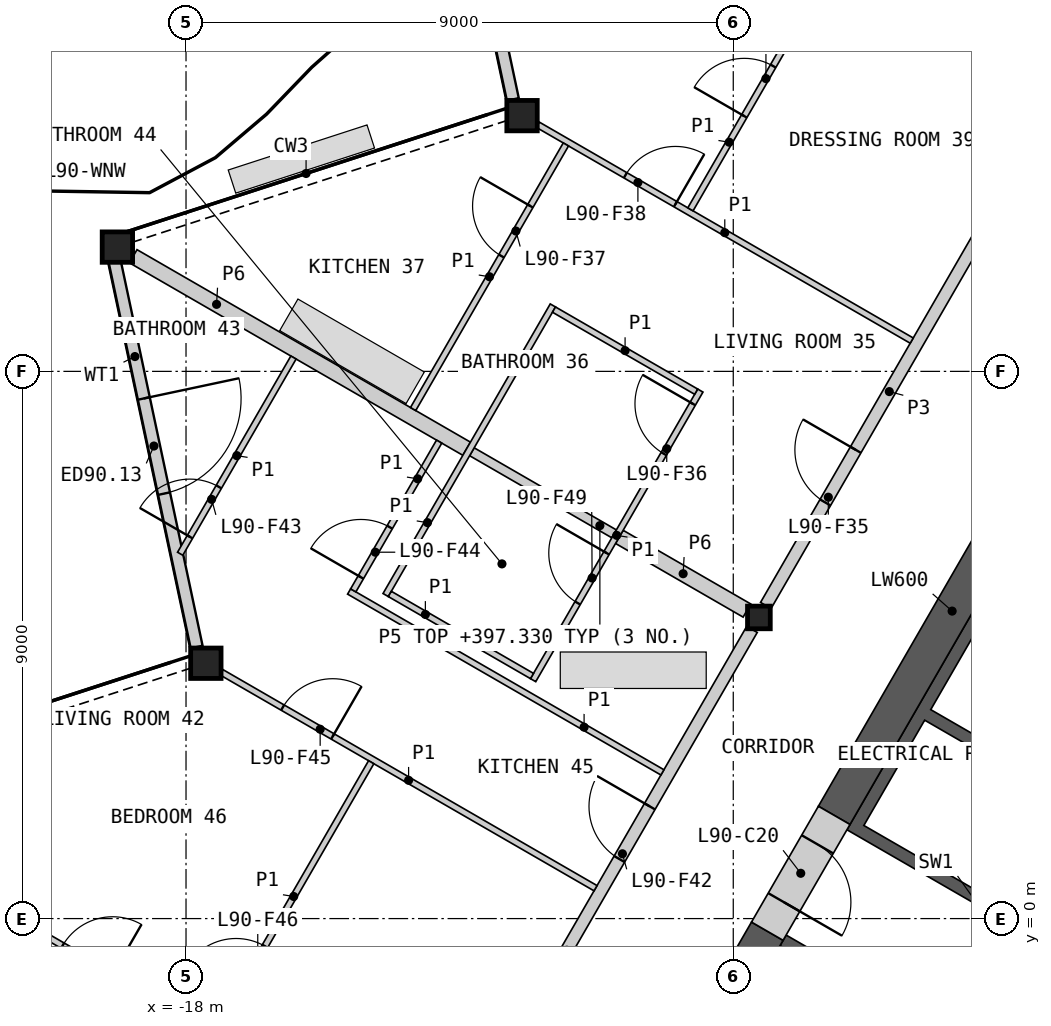
"""IFC4 building model, lengths in metres.
Left out: names, types, materials, properties, quantities, classifications, styles, units other than length and angle.
Written with IfcOpenShell. Run it as: python <this file> out.ifc"""

import sys

from ifc_helpers import new_model, si_unit, direction, frame, frame_2d, origin, origin_2d, place, context, subcontext, project, spatial, polyline, rectangle, hollow_rectangle, i_section, outline, extrude, element, fill, save


model = new_model("IFC4")
c1 = context("Model", 3, precision=1e-05, world=origin(), true_north=direction((0.0, 1.0)))
c2 = subcontext(c1, "Body", "Model", "MODEL_VIEW")
j1 = project(units=[si_unit("LENGTHUNIT", "METRE"), si_unit("PLANEANGLEUNIT", "RADIAN")], contexts=[c1])
p1 = place(None, origin())
s1 = spatial("IfcSite", under=j1, at=p1, CompositionType="ELEMENT")
p2 = place(p1, origin())
s2 = spatial("IfcBuilding", under=s1, at=p2, CompositionType="ELEMENT")
p3 = place(p2, frame((0.0, 0.0, 395.0)))
s3 = spatial("IfcBuildingStorey", under=s2, at=p3, CompositionType="ELEMENT", Elevation=395.0)
for number, where, z_axis, x_axis in (
    (1, (-12.474, 13.206, 0.0), (0.0, 0.0, 1.0), (1.0, 0.0, 0.0)),
    (2, (-19.129, 11.044, 0.0), (0.0, 0.0, 1.0), (1.0, 0.0, 0.0)),
    (3, (-17.674, 4.199, 0.0), (0.0, 0.0, 1.0), (1.0, 0.0, 0.0)),
):
    element("IfcColumn", number, at=place(p3, frame(where, z_axis=z_axis, x_axis=x_axis)), inside=s3, PredefinedType="COLUMN", context=c2, shape_type="SweptSolid", body=[
        extrude(hollow_rectangle(XDim=0.5, YDim=0.5, WallThickness=0.03, at=origin_2d()), origin(), (0.0, 0.0, 1.0), 3.4),
    ])
p4 = place(p3, frame((-8.578, 4.953, 0.0), z_axis=(0.0, 0.0, 1.0), x_axis=(1.0, 0.0, 0.0)))
e4 = element("IfcColumn", 4, at=p4, inside=s3, PredefinedType="COLUMN", context=c2, shape_type="SweptSolid", body=[
    extrude(i_section(OverallWidth=0.374, OverallDepth=0.372, WebThickness=0.016, FlangeThickness=0.026, at=origin_2d()), origin(), (0.0, 0.0, 1.0), 3.4),
])
p5 = place(p3, frame((-13.979, 19.843, 0.0), z_axis=(0.0, 0.0, 1.0), x_axis=(0.207910765171, -0.978147797486, 0.0)))
e5 = element("IfcWall", 5, at=p5, inside=s3, PredefinedType="SOLIDWALL", context=c2, shape_type="SweptSolid", body=[
    extrude(rectangle(XDim=6.512, YDim=0.2, at=frame_2d((3.256, 0.0))), origin(), (0.0, 0.0, 1.0), 2.634),
])
p6 = place(p5, frame((2.333, 0.0, 0.0)))
e6 = element("IfcOpeningElement", 6, at=p6, cuts=e5, PredefinedType="OPENING", context=c2, shape_type="SweptSolid", body=[
    extrude(rectangle(XDim=1.6, YDim=2.25, at=frame_2d((0.8, 1.125))), frame((0.0, 0.11, 0.0), z_axis=(0.0, -1.0, 0.0), x_axis=(1.0, 0.0, 0.0)), (0.0, 0.0, 1.0), 0.22),
])
p7 = place(p3, frame((-19.179, 10.836, 0.0), z_axis=(0.0, 0.0, 1.0), x_axis=(0.207910765171, -0.978147797486, 0.0)))
e7 = element("IfcWall", 7, at=p7, inside=s3, PredefinedType="SOLIDWALL", context=c2, shape_type="SweptSolid", body=[
    extrude(rectangle(XDim=6.512, YDim=0.2, at=frame_2d((3.256, 0.0))), origin(), (0.0, 0.0, 1.0), 2.634),
])
p8 = place(p7, frame((2.333, 0.0, 0.0)))
e8 = element("IfcOpeningElement", 8, at=p8, cuts=e7, PredefinedType="OPENING", context=c2, shape_type="SweptSolid", body=[
    extrude(rectangle(XDim=1.6, YDim=2.25, at=frame_2d((0.8, 1.125))), frame((0.0, 0.11, 0.0), z_axis=(0.0, -1.0, 0.0), x_axis=(1.0, 0.0, 0.0)), (0.0, 0.0, 1.0), 0.22),
])
p9 = place(p3, origin())
e9 = element("IfcWall", 9, at=p9, inside=s3, PredefinedType="SHEAR", context=c2, shape_type="SweptSolid", body=[
    extrude(outline(polyline([(-6.061, -1.697), (-8.231, -0.444), (-8.131, -0.271), (-5.96, -1.524), (-6.061, -1.697)])), origin(), (0.0, 0.0, 1.0), 3.1),
])
p10 = place(p3, origin())
e10 = element("IfcWall", 10, at=p10, inside=s3, PredefinedType="SHEAR", context=c2, shape_type="SweptSolid", body=[
    extrude(outline(polyline([(-4.96, 0.208), (-7.131, 1.461), (-3.731, 7.35), (-1.561, 6.097), (-1.66, 5.924), (-3.652, 7.074), (-5.752, 3.437), (-3.76, 2.287), (-3.861, 2.113), (-5.852, 3.263), (-6.852, 1.531), (-4.861, 0.381), (-4.96, 0.208)])), origin(), (0.0, 0.0, 1.0), 3.1),
])
p11 = place(p3, frame((-3.461, 8.417, 0.0), z_axis=(0.0, 0.0, 1.0), x_axis=(-0.50000391502, -0.866023143435, 0.0)))
e11 = element("IfcWall", 11, at=p11, inside=s3, PredefinedType="SHEAR", context=c2, shape_type="SweptSolid", body=[
    extrude(rectangle(XDim=7.759, YDim=0.6, at=frame_2d((3.879, 0.0))), origin(), (0.0, 0.0, 1.0), 3.1),
])
p12 = place(p3, frame((-8.44, -0.208, 0.0), z_axis=(0.0, 0.0, 1.0), x_axis=(-0.500007425856, -0.866021116422, 0.0)))
e12 = element("IfcWall", 12, at=p12, inside=s3, PredefinedType="SHEAR", context=c2, shape_type="SweptSolid", body=[
    extrude(rectangle(XDim=4.969, YDim=0.6, at=frame_2d((2.484, 0.0))), origin(), (0.0, 0.0, 1.0), 3.1),
])
p13 = place(p3, frame((-7.34, 1.698, 0.0), z_axis=(0.0, 0.0, 1.0), x_axis=(-0.50002983664, -0.866008176907, 0.0)))
e13 = element("IfcWall", 13, at=p13, inside=s3, PredefinedType="SHEAR", context=c2, shape_type="SweptSolid", body=[
    extrude(rectangle(XDim=2.2, YDim=0.6, at=frame_2d((1.1, 0.0))), origin(), (0.0, 0.0, 1.0), 3.1),
])
p14 = place(p13, frame((0.55, 0.0, 0.0)))
e14 = element("IfcOpeningElement", 14, at=p14, cuts=e13, PredefinedType="OPENING", context=c2, shape_type="SweptSolid", body=[
    extrude(rectangle(XDim=1.1, YDim=2.1, at=frame_2d((0.55, 1.05))), frame((0.0, 0.31, 0.0), z_axis=(0.0, -1.0, 0.0), x_axis=(1.0, 0.0, 0.0)), (0.0, 0.0, 1.0), 0.62),
])
p15 = place(p3, frame((-8.465, 5.15, 0.0), z_axis=(0.0, 0.0, 1.0), x_axis=(0.499992155518, 0.866029932751, 0.0)))
e15 = element("IfcWall", 15, at=p15, inside=s3, PredefinedType="PARTITIONING", context=c2, shape_type="SweptSolid", body=[
    extrude(rectangle(XDim=8.123, YDim=0.2, at=frame_2d((4.062, 0.0))), origin(), (0.0, 0.0, 1.0), 3.1),
])
p16 = place(p15, frame((1.956, 0.0, 0.0)))
e16 = element("IfcOpeningElement", 16, at=p16, cuts=e15, PredefinedType="OPENING", context=c2, shape_type="SweptSolid", body=[
    extrude(rectangle(XDim=1.0, YDim=2.1, at=frame_2d((0.5, 1.05))), frame((0.0, 0.11, 0.0), z_axis=(0.0, -1.0, 0.0), x_axis=(1.0, 0.0, 0.0)), (0.0, 0.0, 1.0), 0.22),
])
p17 = place(p3, frame((-12.754, -2.279, 0.0), z_axis=(0.0, 0.0, 1.0), x_axis=(0.500001682468, 0.866024432409, 0.0)))
e17 = element("IfcWall", 17, at=p17, inside=s3, PredefinedType="PARTITIONING", context=c2, shape_type="SweptSolid", body=[
    extrude(rectangle(XDim=8.124, YDim=0.2, at=frame_2d((4.062, 0.0))), origin(), (0.0, 0.0, 1.0), 3.1),
])
p18 = place(p17, frame((3.762, 0.0, 0.0)))
e18 = element("IfcOpeningElement", 18, at=p18, cuts=e17, PredefinedType="OPENING", context=c2, shape_type="SweptSolid", body=[
    extrude(rectangle(XDim=1.0, YDim=2.1, at=frame_2d((0.5, 1.05))), frame((0.0, 0.11, 0.0), z_axis=(0.0, -1.0, 0.0), x_axis=(1.0, 0.0, 0.0)), (0.0, 0.0, 1.0), 0.22),
])
p19 = place(p3, frame((-18.869, 10.894, 0.0), z_axis=(0.0, 0.0, 1.0), x_axis=(0.866023139795, -0.500003921324, 0.0)))
e19 = element("IfcWall", 19, at=p19, inside=s3, PredefinedType="PARTITIONING", context=c2, shape_type="SweptSolid", body=[
    extrude(rectangle(XDim=6.332, YDim=0.25, at=frame_2d((3.166, 0.0))), origin(), (0.0, 0.0, 1.0), 2.33),
])
p20 = place(p3, frame((-10.873, 6.278, 0.0), z_axis=(0.0, 0.0, 1.0), x_axis=(0.865989219354, -0.500062668036, 0.0)))
e20 = element("IfcWall", 20, at=p20, inside=s3, PredefinedType="PARTITIONING", context=c2, shape_type="SweptSolid", body=[
    extrude(rectangle(XDim=2.423, YDim=0.25, at=frame_2d((1.211, 0.0))), origin(), (0.0, 0.0, 1.0), 2.33),
])
p21 = place(p3, frame((-13.298, 7.678, 0.0), z_axis=(0.0, 0.0, 1.0), x_axis=(0.866059108428, -0.4999416173, 0.0)))
e21 = element("IfcWall", 21, at=p21, inside=s3, PredefinedType="PLUMBINGWALL", context=c2, shape_type="SweptSolid", body=[
    extrude(rectangle(XDim=2.7, YDim=0.15, at=frame_2d((1.35, 0.0))), origin(), (0.0, 0.0, 1.0), 2.33),
])
p22 = place(p3, frame((-13.669, 19.9, 0.0), z_axis=(0.0, 0.0, 1.0), x_axis=(0.866032376801, -0.499987922186, 0.0)))
e22 = element("IfcWall", 22, at=p22, inside=s3, PredefinedType="PARTITIONING", context=c2, shape_type="SweptSolid", body=[
    extrude(rectangle(XDim=11.782, YDim=0.1, at=frame_2d((5.891, 0.0))), origin(), (0.0, 0.0, 1.0), 2.33),
])
p23 = place(p22, frame((4.664, 0.0, 0.0)))
e23 = element("IfcOpeningElement", 23, at=p23, cuts=e22, PredefinedType="OPENING", context=c2, shape_type="SweptSolid", body=[
    extrude(rectangle(XDim=0.95, YDim=2.1, at=frame_2d((0.475, 1.05))), frame((0.0, 0.06, 0.0), z_axis=(0.0, -1.0, 0.0), x_axis=(1.0, 0.0, 0.0)), (0.0, 0.0, 1.0), 0.12),
])
p24 = place(p3, frame((-24.069, 1.887, 0.0), z_axis=(0.0, 0.0, 1.0), x_axis=(0.866023404247, -0.500003463284, 0.0)))
e24 = element("IfcWall", 24, at=p24, inside=s3, PredefinedType="PARTITIONING", context=c2, shape_type="SweptSolid", body=[
    extrude(rectangle(XDim=11.782, YDim=0.1, at=frame_2d((5.891, 0.0))), origin(), (0.0, 0.0, 1.0), 2.33),
])
p25 = place(p24, frame((4.664, 0.0, 0.0)))
e25 = element("IfcOpeningElement", 25, at=p25, cuts=e24, PredefinedType="OPENING", context=c2, shape_type="SweptSolid", body=[
    extrude(rectangle(XDim=0.95, YDim=2.1, at=frame_2d((0.475, 1.05))), frame((0.0, 0.06, 0.0), z_axis=(0.0, -1.0, 0.0), x_axis=(1.0, 0.0, 0.0)), (0.0, 0.0, 1.0), 0.12),
])
p26 = place(p3, frame((-12.214, 13.056, 0.0), z_axis=(0.0, 0.0, 1.0), x_axis=(0.866018949465, -0.500011179042, 0.0)))
e26 = element("IfcWall", 26, at=p26, inside=s3, PredefinedType="PARTITIONING", context=c2, shape_type="SweptSolid", body=[
    extrude(rectangle(XDim=7.1, YDim=0.1, at=frame_2d((3.55, 0.0))), origin(), (0.0, 0.0, 1.0), 2.33),
])
p27 = place(p26, frame((1.663, 0.0, 0.0)))
e27 = element("IfcOpeningElement", 27, at=p27, cuts=e26, PredefinedType="OPENING", context=c2, shape_type="SweptSolid", body=[
    extrude(rectangle(XDim=0.95, YDim=2.1, at=frame_2d((0.475, 1.05))), frame((0.0, 0.06, 0.0), z_axis=(0.0, -1.0, 0.0), x_axis=(1.0, 0.0, 0.0)), (0.0, 0.0, 1.0), 0.12),
])
p28 = place(p3, frame((-17.414, 4.049, 0.0), z_axis=(0.0, 0.0, 1.0), x_axis=(0.866033839264, -0.499985389037, 0.0)))
e28 = element("IfcWall", 28, at=p28, inside=s3, PredefinedType="PARTITIONING", context=c2, shape_type="SweptSolid", body=[
    extrude(rectangle(XDim=7.1, YDim=0.1, at=frame_2d((3.55, 0.0))), origin(), (0.0, 0.0, 1.0), 2.33),
])
p29 = place(p28, frame((1.158, 0.0, 0.0)))
e29 = element("IfcOpeningElement", 29, at=p29, cuts=e28, PredefinedType="OPENING", context=c2, shape_type="SweptSolid", body=[
    extrude(rectangle(XDim=0.95, YDim=2.1, at=frame_2d((0.475, 1.05))), frame((0.0, 0.06, 0.0), z_axis=(0.0, -1.0, 0.0), x_axis=(1.0, 0.0, 0.0)), (0.0, 0.0, 1.0), 0.12),
])
p30 = place(p3, frame((-15.318, 5.38, 0.0), z_axis=(0.0, 0.0, 1.0), x_axis=(0.866035260786, -0.499982926783, 0.0)))
e30 = element("IfcWall", 30, at=p30, inside=s3, PredefinedType="PARTITIONING", context=c2, shape_type="SweptSolid", body=[
    extrude(rectangle(XDim=5.95, YDim=0.1, at=frame_2d((2.975, 0.0))), origin(), (0.0, 0.0, 1.0), 2.33),
])
p31 = place(p3, frame((-14.717, 5.321, 0.0), z_axis=(0.0, 0.0, 1.0), x_axis=(0.500015767406, 0.866016300277, 0.0)))
e31 = element("IfcWall", 31, at=p31, inside=s3, PredefinedType="PARTITIONING", context=c2, shape_type="SweptSolid", body=[
    extrude(rectangle(XDim=5.5, YDim=0.1, at=frame_2d((2.75, 0.0))), origin(), (0.0, 0.0, 1.0), 2.33),
])
p32 = place(p3, frame((-12.292, 3.921, 0.0), z_axis=(0.0, 0.0, 1.0), x_axis=(0.499996545922, 0.866027397988, 0.0)))
e32 = element("IfcWall", 32, at=p32, inside=s3, PredefinedType="PARTITIONING", context=c2, shape_type="SweptSolid", body=[
    extrude(rectangle(XDim=5.5, YDim=0.1, at=frame_2d((2.75, 0.0))), origin(), (0.0, 0.0, 1.0), 2.33),
])
p33 = place(p32, frame((4.3, 0.0, 0.0)))
e33 = element("IfcOpeningElement", 33, at=p33, cuts=e32, PredefinedType="OPENING", context=c2, shape_type="SweptSolid", body=[
    extrude(rectangle(XDim=0.95, YDim=2.1, at=frame_2d((0.475, 1.05))), frame((0.0, 0.06, 0.0), z_axis=(0.0, -1.0, 0.0), x_axis=(1.0, 0.0, 0.0)), (0.0, 0.0, 1.0), 0.12),
])
p34 = place(p32, frame((1.465, 0.0, 0.0)))
e34 = element("IfcOpeningElement", 34, at=p34, cuts=e32, PredefinedType="OPENING", context=c2, shape_type="SweptSolid", body=[
    extrude(rectangle(XDim=0.95, YDim=2.1, at=frame_2d((0.475, 1.05))), frame((0.0, 0.06, 0.0), z_axis=(0.0, -1.0, 0.0), x_axis=(1.0, 0.0, 0.0)), (0.0, 0.0, 1.0), 0.12),
])
p35 = place(p3, frame((-9.704, 11.665, 0.0), z_axis=(0.0, 0.0, 1.0), x_axis=(0.499984882974, 0.866034131428, 0.0)))
e35 = element("IfcWall", 35, at=p35, inside=s3, PredefinedType="PARTITIONING", context=c2, shape_type="SweptSolid", body=[
    extrude(rectangle(XDim=5.1, YDim=0.1, at=frame_2d((2.55, 0.0))), origin(), (0.0, 0.0, 1.0), 2.33),
])
p36 = place(p35, frame((1.771, 0.0, 0.0)))
e36 = element("IfcOpeningElement", 36, at=p36, cuts=e35, PredefinedType="OPENING", context=c2, shape_type="SweptSolid", body=[
    extrude(rectangle(XDim=0.95, YDim=2.1, at=frame_2d((0.475, 1.05))), frame((0.0, 0.06, 0.0), z_axis=(0.0, -1.0, 0.0), x_axis=(1.0, 0.0, 0.0)), (0.0, 0.0, 1.0), 0.12),
])
p37 = place(p3, frame((-17.504, -1.845, 0.0), z_axis=(0.0, 0.0, 1.0), x_axis=(0.499984882974, 0.866034131428, 0.0)))
e37 = element("IfcWall", 37, at=p37, inside=s3, PredefinedType="PARTITIONING", context=c2, shape_type="SweptSolid", body=[
    extrude(rectangle(XDim=5.1, YDim=0.1, at=frame_2d((2.55, 0.0))), origin(), (0.0, 0.0, 1.0), 2.33),
])
p38 = place(p37, frame((0.656, 0.0, 0.0)))
e38 = element("IfcOpeningElement", 38, at=p38, cuts=e37, PredefinedType="OPENING", context=c2, shape_type="SweptSolid", body=[
    extrude(rectangle(XDim=0.95, YDim=2.1, at=frame_2d((0.475, 1.05))), frame((0.0, 0.06, 0.0), z_axis=(0.0, -1.0, 0.0), x_axis=(1.0, 0.0, 0.0)), (0.0, 0.0, 1.0), 0.12),
])
p39 = place(p3, frame((-14.265, 8.38, 0.0), z_axis=(0.0, 0.0, 1.0), x_axis=(0.500026652407, 0.866010015463, 0.0)))
e39 = element("IfcWall", 39, at=p39, inside=s3, PredefinedType="PARTITIONING", context=c2, shape_type="SweptSolid", body=[
    extrude(rectangle(XDim=5.025, YDim=0.1, at=frame_2d((2.513, 0.0))), origin(), (0.0, 0.0, 1.0), 2.33),
])
p40 = place(p39, frame((2.906, 0.0, 0.0)))
e40 = element("IfcOpeningElement", 40, at=p40, cuts=e39, PredefinedType="OPENING", context=c2, shape_type="SweptSolid", body=[
    extrude(rectangle(XDim=0.95, YDim=2.1, at=frame_2d((0.475, 1.05))), frame((0.0, 0.06, 0.0), z_axis=(0.0, -1.0, 0.0), x_axis=(1.0, 0.0, 0.0)), (0.0, 0.0, 1.0), 0.12),
])
p41 = place(p3, frame((-18.096, 6.0, 0.0), z_axis=(0.0, 0.0, 1.0), x_axis=(0.500000333706, 0.866025211119, 0.0)))
e41 = element("IfcWall", 41, at=p41, inside=s3, PredefinedType="PARTITIONING", context=c2, shape_type="SweptSolid", body=[
    extrude(rectangle(XDim=3.727, YDim=0.1, at=frame_2d((1.863, 0.0))), origin(), (0.0, 0.0, 1.0), 2.33),
])
p42 = place(p41, frame((0.321, 0.0, 0.0)))
e42 = element("IfcOpeningElement", 42, at=p42, cuts=e41, PredefinedType="OPENING", context=c2, shape_type="SweptSolid", body=[
    extrude(rectangle(XDim=0.95, YDim=2.1, at=frame_2d((0.475, 1.05))), frame((0.0, 0.06, 0.0), z_axis=(0.0, -1.0, 0.0), x_axis=(1.0, 0.0, 0.0)), (0.0, 0.0, 1.0), 0.12),
])
p43 = place(p3, frame((-15.25, 5.398, 0.0), z_axis=(0.0, 0.0, 1.0), x_axis=(0.499959355765, 0.866048868473, 0.0)))
e43 = element("IfcWall", 43, at=p43, inside=s3, PredefinedType="PARTITIONING", context=c2, shape_type="SweptSolid", body=[
    extrude(rectangle(XDim=2.825, YDim=0.1, at=frame_2d((1.413, 0.0))), origin(), (0.0, 0.0, 1.0), 2.33),
])
p44 = place(p43, frame((0.25, 0.0, 0.0)))
e44 = element("IfcOpeningElement", 44, at=p44, cuts=e43, PredefinedType="OPENING", context=c2, shape_type="SweptSolid", body=[
    extrude(rectangle(XDim=0.95, YDim=2.1, at=frame_2d((0.475, 1.05))), frame((0.0, 0.06, 0.0), z_axis=(0.0, -1.0, 0.0), x_axis=(1.0, 0.0, 0.0)), (0.0, 0.0, 1.0), 0.12),
])
for number, where, z_axis, x_axis in (
    (45, (-11.948, 10.016, 0.0), (0.0, 0.0, 1.0), (0.866, -0.5, 0.0)),
    (46, (-14.648, 5.34, 0.0), (0.0, 0.0, 1.0), (0.866, -0.5, 0.0)),
):
    element("IfcWall", number, at=place(p3, frame(where, z_axis=z_axis, x_axis=x_axis)), inside=s3, PredefinedType="PARTITIONING", context=c2, shape_type="SweptSolid", body=[
        extrude(rectangle(XDim=2.7, YDim=0.1, at=frame_2d((1.35, 0.0))), origin(), (0.0, 0.0, 1.0), 2.33),
    ])
p45 = place(p8, origin())
e47 = element("IfcDoor", 47, at=p45, inside=s3, OperationType="DOUBLE_DOOR_SINGLE_SWING", PredefinedType="DOOR", context=c2, shape_type="SweptSolid", body=[
    extrude(rectangle(XDim=1.6, YDim=2.25, at=frame_2d((0.8, 1.125))), frame((0.0, 0.025, 0.0), z_axis=(0.0, -1.0, 0.0), x_axis=(1.0, 0.0, 0.0)), (0.0, 0.0, 1.0), 0.05),
])
fill(e8, e47)
p46 = place(p14, origin())
e48 = element("IfcDoor", 48, at=p46, inside=s3, OperationType="SINGLE_SWING_RIGHT", PredefinedType="DOOR", context=c2, shape_type="SweptSolid", body=[
    extrude(rectangle(XDim=1.1, YDim=2.1, at=frame_2d((0.55, 1.05))), frame((0.0, 0.055, 0.0), z_axis=(0.0, -1.0, 0.0), x_axis=(1.0, 0.0, 0.0)), (0.0, 0.0, 1.0), 0.05),
])
fill(e14, e48)
p47 = place(p16, origin())
e49 = element("IfcDoor", 49, at=p47, inside=s3, OperationType="SINGLE_SWING_RIGHT", PredefinedType="DOOR", context=c2, shape_type="SweptSolid", body=[
    extrude(rectangle(XDim=1.0, YDim=2.1, at=frame_2d((0.5, 1.05))), frame((0.0, 0.025, 0.0), z_axis=(0.0, -1.0, 0.0), x_axis=(1.0, 0.0, 0.0)), (0.0, 0.0, 1.0), 0.05),
])
fill(e16, e49)
p48 = place(p33, origin())
e50 = element("IfcDoor", 50, at=p48, inside=s3, OperationType="SINGLE_SWING_RIGHT", PredefinedType="DOOR", context=c2, shape_type="SweptSolid", body=[
    extrude(rectangle(XDim=0.95, YDim=2.1, at=frame_2d((0.475, 1.05))), frame((0.0, 0.025, 0.0), z_axis=(0.0, -1.0, 0.0), x_axis=(1.0, 0.0, 0.0)), (0.0, 0.0, 1.0), 0.05),
])
fill(e33, e50)
p49 = place(p40, origin())
e51 = element("IfcDoor", 51, at=p49, inside=s3, OperationType="SINGLE_SWING_RIGHT", PredefinedType="DOOR", context=c2, shape_type="SweptSolid", body=[
    extrude(rectangle(XDim=0.95, YDim=2.1, at=frame_2d((0.475, 1.05))), frame((0.0, 0.025, 0.0), z_axis=(0.0, -1.0, 0.0), x_axis=(1.0, 0.0, 0.0)), (0.0, 0.0, 1.0), 0.05),
])
fill(e40, e51)
p50 = place(p27, origin())
e52 = element("IfcDoor", 52, at=p50, inside=s3, OperationType="SINGLE_SWING_RIGHT", PredefinedType="DOOR", context=c2, shape_type="SweptSolid", body=[
    extrude(rectangle(XDim=0.95, YDim=2.1, at=frame_2d((0.475, 1.05))), frame((0.0, 0.025, 0.0), z_axis=(0.0, -1.0, 0.0), x_axis=(1.0, 0.0, 0.0)), (0.0, 0.0, 1.0), 0.05),
])
fill(e27, e52)
p51 = place(p36, origin())
e53 = element("IfcDoor", 53, at=p51, inside=s3, OperationType="SINGLE_SWING_LEFT", PredefinedType="DOOR", context=c2, shape_type="SweptSolid", body=[
    extrude(rectangle(XDim=0.95, YDim=2.1, at=frame_2d((0.475, 1.05))), frame((0.0, 0.025, 0.0), z_axis=(0.0, -1.0, 0.0), x_axis=(1.0, 0.0, 0.0)), (0.0, 0.0, 1.0), 0.05),
])
fill(e36, e53)
p52 = place(p18, origin())
e54 = element("IfcDoor", 54, at=p52, inside=s3, OperationType="SINGLE_SWING_RIGHT", PredefinedType="DOOR", context=c2, shape_type="SweptSolid", body=[
    extrude(rectangle(XDim=1.0, YDim=2.1, at=frame_2d((0.5, 1.05))), frame((0.0, 0.025, 0.0), z_axis=(0.0, -1.0, 0.0), x_axis=(1.0, 0.0, 0.0)), (0.0, 0.0, 1.0), 0.05),
])
fill(e18, e54)
p53 = place(p42, origin())
e55 = element("IfcDoor", 55, at=p53, inside=s3, OperationType="SINGLE_SWING_LEFT", PredefinedType="DOOR", context=c2, shape_type="SweptSolid", body=[
    extrude(rectangle(XDim=0.95, YDim=2.1, at=frame_2d((0.475, 1.05))), frame((0.0, 0.025, 0.0), z_axis=(0.0, -1.0, 0.0), x_axis=(1.0, 0.0, 0.0)), (0.0, 0.0, 1.0), 0.05),
])
fill(e42, e55)
p54 = place(p44, origin())
e56 = element("IfcDoor", 56, at=p54, inside=s3, OperationType="SINGLE_SWING_LEFT", PredefinedType="DOOR", context=c2, shape_type="SweptSolid", body=[
    extrude(rectangle(XDim=0.95, YDim=2.1, at=frame_2d((0.475, 1.05))), frame((0.0, 0.025, 0.0), z_axis=(0.0, -1.0, 0.0), x_axis=(1.0, 0.0, 0.0)), (0.0, 0.0, 1.0), 0.05),
])
fill(e44, e56)
p55 = place(p29, origin())
e57 = element("IfcDoor", 57, at=p55, inside=s3, OperationType="SINGLE_SWING_RIGHT", PredefinedType="DOOR", context=c2, shape_type="SweptSolid", body=[
    extrude(rectangle(XDim=0.95, YDim=2.1, at=frame_2d((0.475, 1.05))), frame((0.0, 0.025, 0.0), z_axis=(0.0, -1.0, 0.0), x_axis=(1.0, 0.0, 0.0)), (0.0, 0.0, 1.0), 0.05),
])
fill(e29, e57)
p56 = place(p38, origin())
e58 = element("IfcDoor", 58, at=p56, inside=s3, OperationType="SINGLE_SWING_LEFT", PredefinedType="DOOR", context=c2, shape_type="SweptSolid", body=[
    extrude(rectangle(XDim=0.95, YDim=2.1, at=frame_2d((0.475, 1.05))), frame((0.0, 0.025, 0.0), z_axis=(0.0, -1.0, 0.0), x_axis=(1.0, 0.0, 0.0)), (0.0, 0.0, 1.0), 0.05),
])
fill(e38, e58)
p57 = place(p25, origin())
e59 = element("IfcDoor", 59, at=p57, inside=s3, OperationType="SINGLE_SWING_RIGHT", PredefinedType="DOOR", context=c2, shape_type="SweptSolid", body=[
    extrude(rectangle(XDim=0.95, YDim=2.1, at=frame_2d((0.475, 1.05))), frame((0.0, 0.025, 0.0), z_axis=(0.0, -1.0, 0.0), x_axis=(1.0, 0.0, 0.0)), (0.0, 0.0, 1.0), 0.05),
])
fill(e25, e59)
p58 = place(p34, origin())
e60 = element("IfcDoor", 60, at=p58, inside=s3, OperationType="SINGLE_SWING_RIGHT", PredefinedType="DOOR", context=c2, shape_type="SweptSolid", body=[
    extrude(rectangle(XDim=0.95, YDim=2.1, at=frame_2d((0.475, 1.05))), frame((0.0, 0.025, 0.0), z_axis=(0.0, -1.0, 0.0), x_axis=(1.0, 0.0, 0.0)), (0.0, 0.0, 1.0), 0.05),
])
fill(e34, e60)
save(model, sys.argv[1])
